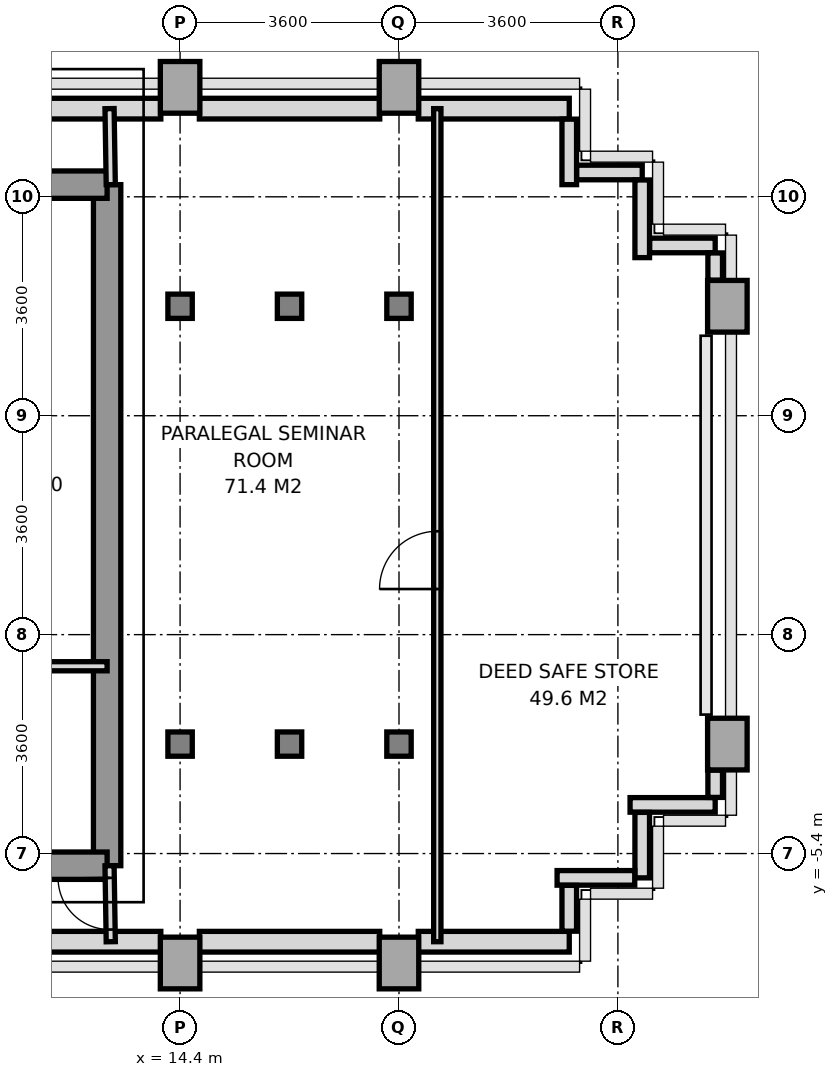
"""IFC4 building model, lengths in metres.
Left out: names, types, materials, properties, quantities, classifications, styles, units other than length and angle.
Written with IfcOpenShell. Run it as: python <this file> out.ifc"""

import sys

from ifc_helpers import new_model, si_unit, direction, frame, frame_2d, origin, origin_2d, place, context, subcontext, project, spatial, rectangle, i_section, extrude, source, transform, mapped, element, fill, save


model = new_model("IFC4")
c1 = context("Model", 3, precision=1e-05, world=origin(), true_north=direction((0.0, 1.0)))
c2 = subcontext(c1, "Body", "Model", "MODEL_VIEW")
j1 = project(units=[si_unit("LENGTHUNIT", "METRE"), si_unit("PLANEANGLEUNIT", "RADIAN")], contexts=[c1])
p1 = place(None, origin())
s1 = spatial("IfcSite", under=j1, at=p1, CompositionType="ELEMENT")
p2 = place(p1, origin())
s2 = spatial("IfcBuilding", under=s1, at=p2, CompositionType="ELEMENT")
p3 = place(p2, frame((0.0, 0.0, 138.0)))
s3 = spatial("IfcBuildingStorey", under=s2, at=p3, CompositionType="ELEMENT", Elevation=138.0)
m1 = source(origin(), c2, "Body", "SweptSolid", [
    extrude(rectangle(XDim=0.65, YDim=0.85, at=origin_2d()), origin(), (0.0, 0.0, 1.0), 3.2),
])
p4 = place(p3, frame((14.4, -7.2, 0.0), z_axis=(0.0, 0.0, 1.0), x_axis=(1.0, 0.0, 0.0)))
e1 = element("IfcColumn", 1, at=p4, inside=s3, PredefinedType="COLUMN", context=c2, shape_type="MappedRepresentation", body=[
    mapped(m1, transform((0.0, 0.0, 0.0), x_axis=(1.0, 0.0, 0.0), y_axis=(0.0, 1.0, 0.0), z_axis=(0.0, 0.0, 1.0), scale=1.0)),
])
m2 = source(origin(), c2, "Body", "SweptSolid", [
    extrude(i_section(OverallWidth=0.401, OverallDepth=0.399, WebThickness=0.02, FlangeThickness=0.032, at=origin_2d()), origin(), (0.0, 0.0, 1.0), 3.2),
])
for number, where, z_axis, x_axis in (
    (2, (14.4, -3.6, 0.0), (0.0, 0.0, 1.0), (1.0, 0.0, 0.0)),
    (3, (14.4, 3.6, 0.0), (0.0, 0.0, 1.0), (1.0, 0.0, 0.0)),
):
    element("IfcColumn", number, at=place(p3, frame(where, z_axis=z_axis, x_axis=x_axis)), inside=s3, PredefinedType="COLUMN", context=c2, shape_type="MappedRepresentation", body=[
        mapped(m2, transform((0.0, 0.0, 0.0), x_axis=(1.0, 0.0, 0.0), y_axis=(0.0, 1.0, 0.0), z_axis=(0.0, 0.0, 1.0), scale=1.0)),
    ])
p5 = place(p3, frame((14.4, 7.2, 0.0), z_axis=(0.0, 0.0, 1.0), x_axis=(1.0, 0.0, 0.0)))
e4 = element("IfcColumn", 4, at=p5, inside=s3, PredefinedType="COLUMN", context=c2, shape_type="MappedRepresentation", body=[
    mapped(m1, transform((0.0, 0.0, 0.0), x_axis=(1.0, 0.0, 0.0), y_axis=(0.0, 1.0, 0.0), z_axis=(0.0, 0.0, 1.0), scale=1.0)),
])
for number, where, z_axis, x_axis in (
    (5, (16.2, -3.6, 0.0), (0.0, 0.0, 1.0), (1.0, 0.0, 0.0)),
    (6, (16.2, 3.6, 0.0), (0.0, 0.0, 1.0), (1.0, 0.0, 0.0)),
):
    element("IfcColumn", number, at=place(p3, frame(where, z_axis=z_axis, x_axis=x_axis)), inside=s3, PredefinedType="COLUMN", context=c2, shape_type="MappedRepresentation", body=[
        mapped(m2, transform((0.0, 0.0, 0.0), x_axis=(1.0, 0.0, 0.0), y_axis=(0.0, 1.0, 0.0), z_axis=(0.0, 0.0, 1.0), scale=1.0)),
    ])
p6 = place(p3, frame((18.0, -7.2, 0.0), z_axis=(0.0, 0.0, 1.0), x_axis=(1.0, 0.0, 0.0)))
e7 = element("IfcColumn", 7, at=p6, inside=s3, PredefinedType="COLUMN", context=c2, shape_type="MappedRepresentation", body=[
    mapped(m1, transform((0.0, 0.0, 0.0), x_axis=(1.0, 0.0, 0.0), y_axis=(0.0, 1.0, 0.0), z_axis=(0.0, 0.0, 1.0), scale=1.0)),
])
for number, where, z_axis, x_axis in (
    (8, (18.0, -3.6, 0.0), (0.0, 0.0, 1.0), (1.0, 0.0, 0.0)),
    (9, (18.0, 3.6, 0.0), (0.0, 0.0, 1.0), (1.0, 0.0, 0.0)),
):
    element("IfcColumn", number, at=place(p3, frame(where, z_axis=z_axis, x_axis=x_axis)), inside=s3, PredefinedType="COLUMN", context=c2, shape_type="MappedRepresentation", body=[
        mapped(m2, transform((0.0, 0.0, 0.0), x_axis=(1.0, 0.0, 0.0), y_axis=(0.0, 1.0, 0.0), z_axis=(0.0, 0.0, 1.0), scale=1.0)),
    ])
for number, where, z_axis, x_axis in (
    (10, (18.0, 7.2, 0.0), (0.0, 0.0, 1.0), (1.0, 0.0, 0.0)),
    (11, (23.4, -3.6, 0.0), (0.0, 0.0, 1.0), (1.0, 0.0, 0.0)),
    (12, (23.4, 3.6, 0.0), (0.0, 0.0, 1.0), (1.0, 0.0, 0.0)),
):
    element("IfcColumn", number, at=place(p3, frame(where, z_axis=z_axis, x_axis=x_axis)), inside=s3, PredefinedType="COLUMN", context=c2, shape_type="MappedRepresentation", body=[
        mapped(m1, transform((0.0, 0.0, 0.0), x_axis=(1.0, 0.0, 0.0), y_axis=(0.0, 1.0, 0.0), z_axis=(0.0, 0.0, 1.0), scale=1.0)),
    ])
p7 = place(p3, frame((11.498, 6.85, 0.0), z_axis=(0.0, 0.0, 1.0), x_axis=(1.0, 0.0, 0.0)))
e13 = element("IfcWall", 13, at=p7, inside=s3, PredefinedType="SOLIDWALL", context=c2, shape_type="SweptSolid", body=[
    extrude(rectangle(XDim=2.585, YDim=0.34, at=frame_2d((1.292, 0.0))), origin(), (0.0, 0.0, 1.0), 3.2),
])
p8 = place(p3, frame((14.717, 6.85, 0.0), z_axis=(0.0, 0.0, 1.0), x_axis=(1.0, 0.0, 0.0)))
e14 = element("IfcWall", 14, at=p8, inside=s3, PredefinedType="SOLIDWALL", context=c2, shape_type="SweptSolid", body=[
    extrude(rectangle(XDim=2.966, YDim=0.34, at=frame_2d((1.483, 0.0))), origin(), (0.0, 0.0, 1.0), 2.45),
])
p9 = place(p3, frame((18.317, 6.85, 0.0), z_axis=(0.0, 0.0, 1.0), x_axis=(1.0, 0.0, 0.0)))
e15 = element("IfcWall", 15, at=p9, inside=s3, PredefinedType="SOLIDWALL", context=c2, shape_type="SweptSolid", body=[
    extrude(rectangle(XDim=2.483, YDim=0.34, at=frame_2d((1.242, 0.0))), origin(), (0.0, 0.0, 1.0), 3.2),
])
p10 = place(p3, frame((11.75, -6.85, 0.0), z_axis=(0.0, 0.0, 1.0), x_axis=(1.0, 0.0, 0.0)))
e16 = element("IfcWall", 16, at=p10, inside=s3, PredefinedType="SOLIDWALL", context=c2, shape_type="SweptSolid", body=[
    extrude(rectangle(XDim=2.333, YDim=0.34, at=frame_2d((1.167, 0.0))), origin(), (0.0, 0.0, 1.0), 3.2),
])
p11 = place(p3, frame((14.717, -6.85, 0.0), z_axis=(0.0, 0.0, 1.0), x_axis=(1.0, 0.0, 0.0)))
e17 = element("IfcWall", 17, at=p11, inside=s3, PredefinedType="SOLIDWALL", context=c2, shape_type="SweptSolid", body=[
    extrude(rectangle(XDim=2.966, YDim=0.34, at=frame_2d((1.483, 0.0))), origin(), (0.0, 0.0, 1.0), 2.45),
])
p12 = place(p3, frame((18.317, -6.85, 0.0), z_axis=(0.0, 0.0, 1.0), x_axis=(1.0, 0.0, 0.0)))
e18 = element("IfcWall", 18, at=p12, inside=s3, PredefinedType="SOLIDWALL", context=c2, shape_type="SweptSolid", body=[
    extrude(rectangle(XDim=2.483, YDim=0.34, at=frame_2d((1.242, 0.0))), origin(), (0.0, 0.0, 1.0), 3.2),
])
p13 = place(p3, frame((23.2, -4.6, 0.0), z_axis=(0.0, 0.0, 1.0), x_axis=(-1.0, 0.0, 0.0)))
e19 = element("IfcWall", 19, at=p13, inside=s3, PredefinedType="PARAPET", context=c2, shape_type="SweptSolid", body=[
    extrude(rectangle(XDim=1.4, YDim=0.24, at=frame_2d((0.7, 0.0))), origin(), (0.0, 0.0, 1.0), 1.15),
])
p14 = place(p3, frame((22.0, -4.723, 0.0), z_axis=(0.0, 0.0, 1.0), x_axis=(0.0, -1.0, 0.0)))
e20 = element("IfcWall", 20, at=p14, inside=s3, PredefinedType="PARAPET", context=c2, shape_type="SweptSolid", body=[
    extrude(rectangle(XDim=1.077, YDim=0.24, at=frame_2d((0.539, 0.0))), origin(), (0.0, 0.0, 1.0), 1.15),
])
p15 = place(p3, frame((21.877, -5.8, 0.0), z_axis=(0.0, 0.0, 1.0), x_axis=(-1.0, 0.0, 0.0)))
e21 = element("IfcWall", 21, at=p15, inside=s3, PredefinedType="PARAPET", context=c2, shape_type="SweptSolid", body=[
    extrude(rectangle(XDim=1.277, YDim=0.24, at=frame_2d((0.638, 0.0))), origin(), (0.0, 0.0, 1.0), 1.15),
])
p16 = place(p3, frame((20.8, -5.923, 0.0), z_axis=(0.0, 0.0, 1.0), x_axis=(0.0, -1.0, 0.0)))
e22 = element("IfcWall", 22, at=p16, inside=s3, PredefinedType="PARAPET", context=c2, shape_type="SweptSolid", body=[
    extrude(rectangle(XDim=0.754, YDim=0.24, at=frame_2d((0.377, 0.0))), origin(), (0.0, 0.0, 1.0), 1.15),
])
for number, where, z_axis, x_axis in (
    (23, (20.8, 6.677, 0.0), (0.0, 0.0, 1.0), (0.0, -1.0, 0.0)),
    (24, (20.923, 5.8, 0.0), (0.0, 0.0, 1.0), (1.0, 0.0, 0.0)),
):
    element("IfcWall", number, at=place(p3, frame(where, z_axis=z_axis, x_axis=x_axis)), inside=s3, PredefinedType="PARAPET", context=c2, shape_type="SweptSolid", body=[
        extrude(rectangle(XDim=1.077, YDim=0.24, at=frame_2d((0.539, 0.0))), origin(), (0.0, 0.0, 1.0), 1.15),
    ])
p17 = place(p3, frame((22.0, 5.677, 0.0), z_axis=(0.0, 0.0, 1.0), x_axis=(0.0, -1.0, 0.0)))
e25 = element("IfcWall", 25, at=p17, inside=s3, PredefinedType="PARAPET", context=c2, shape_type="SweptSolid", body=[
    extrude(rectangle(XDim=1.277, YDim=0.24, at=frame_2d((0.639, 0.0))), origin(), (0.0, 0.0, 1.0), 1.15),
])
p18 = place(p3, frame((22.123, 4.6, 0.0), z_axis=(0.0, 0.0, 1.0), x_axis=(1.0, 0.0, 0.0)))
e26 = element("IfcWall", 26, at=p18, inside=s3, PredefinedType="PARAPET", context=c2, shape_type="SweptSolid", body=[
    extrude(rectangle(XDim=1.077, YDim=0.24, at=frame_2d((0.539, 0.0))), origin(), (0.0, 0.0, 1.0), 1.15),
])
for number, where, z_axis, x_axis in (
    (27, (23.2, 4.477, 0.0), (0.0, 0.0, 1.0), (0.0, -1.0, 0.0)),
    (28, (23.2, -4.028, 0.0), (0.0, 0.0, 1.0), (0.0, -1.0, 0.0)),
):
    element("IfcWall", number, at=place(p3, frame(where, z_axis=z_axis, x_axis=x_axis)), inside=s3, PredefinedType="PARAPET", context=c2, shape_type="SweptSolid", body=[
        extrude(rectangle(XDim=0.449, YDim=0.24, at=frame_2d((0.225, 0.0))), origin(), (0.0, 0.0, 1.0), 1.15),
    ])
p19 = place(p3, frame((13.2, -5.6, 0.0), z_axis=(0.0, 0.0, 1.0), x_axis=(0.0, 1.0, 0.0)))
e29 = element("IfcWall", 29, at=p19, inside=s3, PredefinedType="SHEAR", context=c2, shape_type="SweptSolid", body=[
    extrude(rectangle(XDim=11.2, YDim=0.45, at=frame_2d((5.6, 0.0))), origin(), (0.0, 0.0, 1.0), 3.2),
])
p20 = place(p3, frame((11.381, 5.6, 0.0), z_axis=(0.0, 0.0, 1.0), x_axis=(1.0, 0.0, 0.0)))
e30 = element("IfcWall", 30, at=p20, inside=s3, PredefinedType="SHEAR", context=c2, shape_type="SweptSolid", body=[
    extrude(rectangle(XDim=1.819, YDim=0.45, at=frame_2d((0.909, 0.0))), origin(), (0.0, 0.0, 1.0), 3.2),
])
p21 = place(p3, frame((5.4, -5.6, 0.0), z_axis=(0.0, 0.0, 1.0), x_axis=(1.0, 0.0, 0.0)))
e31 = element("IfcWall", 31, at=p21, inside=s3, PredefinedType="SHEAR", context=c2, shape_type="SweptSolid", body=[
    extrude(rectangle(XDim=7.8, YDim=0.45, at=frame_2d((3.9, 0.0))), origin(), (0.0, 0.0, 1.0), 3.2),
])
p22 = place(p21, frame((3.0, 0.0, 0.0)))
e32 = element("IfcOpeningElement", 32, at=p22, cuts=e31, PredefinedType="OPENING", context=c2, shape_type="SweptSolid", body=[
    extrude(rectangle(XDim=1.2, YDim=2.2, at=frame_2d((0.6, 1.1))), frame((0.0, 0.235, 0.0), z_axis=(0.0, -1.0, 0.0), x_axis=(1.0, 0.0, 0.0)), (0.0, 0.0, 1.0), 0.47),
])
p23 = place(p21, frame((5.85, 0.0, 0.0)))
e33 = element("IfcOpeningElement", 33, at=p23, cuts=e31, PredefinedType="OPENING", context=c2, shape_type="SweptSolid", body=[
    extrude(rectangle(XDim=0.8, YDim=2.1, at=frame_2d((0.4, 1.05))), frame((0.0, 0.235, 0.0), z_axis=(0.0, -1.0, 0.0), x_axis=(1.0, 0.0, 0.0)), (0.0, 0.0, 1.0), 0.47),
])
p24 = place(p3, frame((11.02, -2.32, 0.0), z_axis=(0.0, 0.0, 1.0), x_axis=(1.0, 0.0, 0.0)))
e34 = element("IfcWall", 34, at=p24, inside=s3, PredefinedType="PARTITIONING", context=c2, shape_type="SweptSolid", body=[
    extrude(rectangle(XDim=2.18, YDim=0.15, at=frame_2d((1.09, 0.0))), origin(), (0.0, 0.0, 1.0), 3.2),
])
p25 = place(p3, frame((13.26, 5.6, 0.0), z_axis=(0.0, 0.0, 1.0), x_axis=(-0.016013571389, 0.999871774545, 0.0)))
e35 = element("IfcWall", 35, at=p25, inside=s3, PredefinedType="PARTITIONING", context=c2, shape_type="SweptSolid", body=[
    extrude(rectangle(XDim=1.25, YDim=0.15, at=frame_2d((0.625, 0.0))), origin(), (0.0, 0.0, 1.0), 3.2),
])
p26 = place(p3, frame((13.26, -6.85, 0.0), z_axis=(0.0, 0.0, 1.0), x_axis=(-0.016013571389, 0.999871774545, 0.0)))
e36 = element("IfcWall", 36, at=p26, inside=s3, PredefinedType="PARTITIONING", context=c2, shape_type="SweptSolid", body=[
    extrude(rectangle(XDim=1.25, YDim=0.15, at=frame_2d((0.625, 0.0))), origin(), (0.0, 0.0, 1.0), 3.2),
])
p27 = place(p26, frame((0.2, 0.0, 0.0)))
e37 = element("IfcOpeningElement", 37, at=p27, cuts=e36, PredefinedType="OPENING", context=c2, shape_type="SweptSolid", body=[
    extrude(rectangle(XDim=0.85, YDim=2.1, at=frame_2d((0.425, 1.05))), frame((0.0, 0.085, 0.0), z_axis=(0.0, -1.0, 0.0), x_axis=(1.0, 0.0, 0.0)), (0.0, 0.0, 1.0), 0.17),
])
p28 = place(p3, frame((18.63, -6.85, 0.0), z_axis=(0.0, 0.0, 1.0), x_axis=(0.0, 1.0, 0.0)))
e38 = element("IfcWall", 38, at=p28, inside=s3, PredefinedType="PARTITIONING", context=c2, shape_type="SweptSolid", body=[
    extrude(rectangle(XDim=13.7, YDim=0.12, at=frame_2d((6.85, 0.0))), origin(), (0.0, 0.0, 1.0), 2.7),
])
p29 = place(p28, frame((5.8, 0.0, 0.0)))
e39 = element("IfcOpeningElement", 39, at=p29, cuts=e38, PredefinedType="OPENING", context=c2, shape_type="SweptSolid", body=[
    extrude(rectangle(XDim=0.95, YDim=2.15, at=frame_2d((0.475, 1.075))), frame((0.0, 0.07, 0.0), z_axis=(0.0, -1.0, 0.0), x_axis=(1.0, 0.0, 0.0)), (0.0, 0.0, 1.0), 0.14),
])
m3 = source(origin(), c2, "Body", "SweptSolid", [
    extrude(rectangle(XDim=0.85, YDim=2.1, at=frame_2d((0.425, 1.05))), frame((0.0, 0.025, 0.0), z_axis=(0.0, -1.0, 0.0), x_axis=(1.0, 0.0, 0.0)), (0.0, 0.0, 1.0), 0.05),
])
p30 = place(p27, origin())
e40 = element("IfcDoor", 40, at=p30, inside=s3, OperationType="SINGLE_SWING_RIGHT", PredefinedType="DOOR", context=c2, shape_type="MappedRepresentation", body=[
    mapped(m3, transform((0.0, 0.0, 0.0), x_axis=(1.0, 0.0, 0.0), y_axis=(0.0, 1.0, 0.0), z_axis=(0.0, 0.0, 1.0), scale=1.0)),
])
fill(e37, e40)
m4 = source(origin(), c2, "Body", "SweptSolid", [
    extrude(rectangle(XDim=0.95, YDim=2.15, at=frame_2d((0.475, 1.075))), frame((0.0, 0.025, 0.0), z_axis=(0.0, -1.0, 0.0), x_axis=(1.0, 0.0, 0.0)), (0.0, 0.0, 1.0), 0.05),
])
p31 = place(p29, origin())
e41 = element("IfcDoor", 41, at=p31, inside=s3, OperationType="SINGLE_SWING_LEFT", PredefinedType="DOOR", context=c2, shape_type="MappedRepresentation", body=[
    mapped(m4, transform((0.0, 0.0, 0.0), x_axis=(1.0, 0.0, 0.0), y_axis=(0.0, 1.0, 0.0), z_axis=(0.0, 0.0, 1.0), scale=1.0)),
])
fill(e39, e41)
save(model, sys.argv[1])
